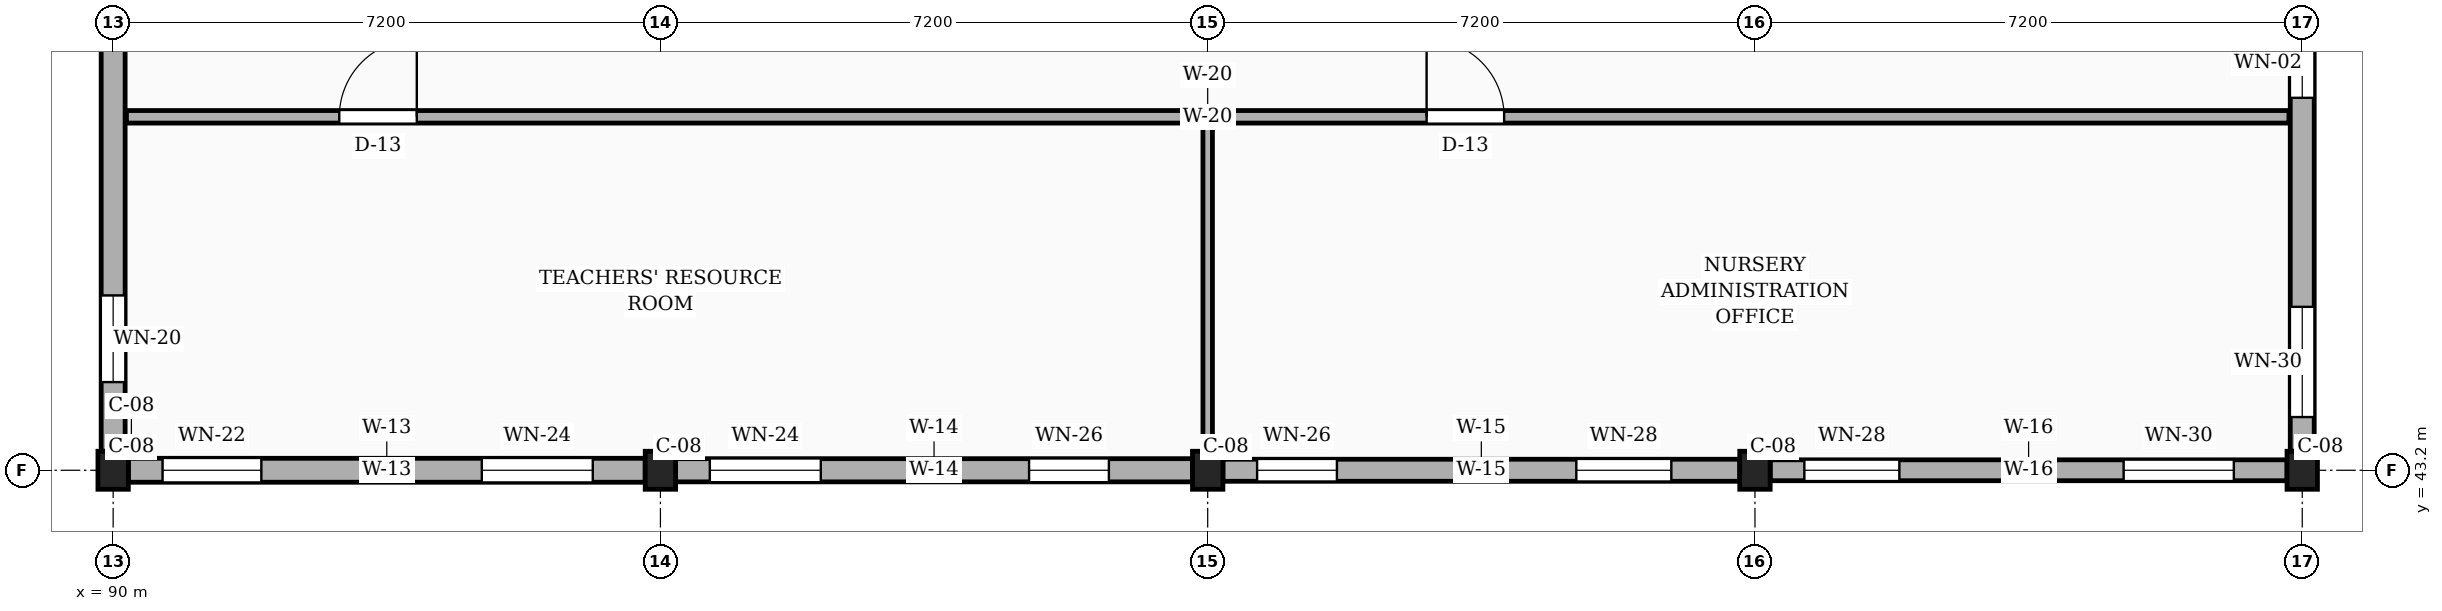
"""IFC4 building model, lengths in metres.
Left out: names, types, materials, properties, quantities, classifications, styles, units other than length and angle.
Written with IfcOpenShell. Run it as: python <this file> out.ifc"""

import sys

from ifc_helpers import new_model, si_unit, direction, frame, frame_2d, origin, origin_2d, place, context, subcontext, project, spatial, rectangle, extrude, element, fill, save


model = new_model("IFC4")
c1 = context("Model", 3, precision=1e-05, world=origin(), true_north=direction((0.0, 1.0)))
c2 = subcontext(c1, "Body", "Model", "MODEL_VIEW")
j1 = project(units=[si_unit("LENGTHUNIT", "METRE"), si_unit("PLANEANGLEUNIT", "RADIAN")], contexts=[c1])
p1 = place(None, origin())
s1 = spatial("IfcSite", under=j1, at=p1, CompositionType="ELEMENT")
p2 = place(p1, origin())
s2 = spatial("IfcBuilding", under=s1, at=p2, CompositionType="ELEMENT")
p3 = place(p2, frame((0.0, 0.0, 4.5)))
s3 = spatial("IfcBuildingStorey", under=s2, at=p3, CompositionType="ELEMENT", Elevation=4.5)
for number, where, z_axis, x_axis in (
    (1, (90.0, 43.2, 0.0), (0.0, 0.0, 1.0), (1.0, 0.0, 0.0)),
    (2, (97.2, 43.2, 0.0), (0.0, 0.0, 1.0), (1.0, 0.0, 0.0)),
    (3, (104.4, 43.2, 0.0), (0.0, 0.0, 1.0), (1.0, 0.0, 0.0)),
    (4, (111.6, 43.2, 0.0), (0.0, 0.0, 1.0), (1.0, 0.0, 0.0)),
    (5, (118.8, 43.2, 0.0), (0.0, 0.0, 1.0), (1.0, 0.0, 0.0)),
):
    element("IfcColumn", number, at=place(p3, frame(where, z_axis=z_axis, x_axis=x_axis)), inside=s3, PredefinedType="COLUMN", context=c2, shape_type="SweptSolid", body=[
        extrude(rectangle(XDim=0.4, YDim=0.5, at=origin_2d()), origin(), (0.0, 0.0, 1.0), 3.15),
    ])
p4 = place(p3, frame((90.2, 43.2, 0.0), z_axis=(0.0, 0.0, 1.0), x_axis=(1.0, 0.0, 0.0)))
e6 = element("IfcWall", 6, at=p4, inside=s3, PredefinedType="SOLIDWALL", context=c2, shape_type="SweptSolid", body=[
    extrude(rectangle(XDim=6.8, YDim=0.315, at=frame_2d((3.4, 0.0))), origin(), (0.0, 0.0, 1.0), 2.34),
])
p5 = place(p4, frame((0.45, 0.0, 0.78)))
e7 = element("IfcOpeningElement", 7, at=p5, cuts=e6, PredefinedType="OPENING", context=c2, shape_type="SweptSolid", body=[
    extrude(rectangle(XDim=1.3, YDim=1.36, at=frame_2d((0.65, 0.68))), frame((0.0, 0.167, 0.0), z_axis=(0.0, -1.0, 0.0), x_axis=(1.0, 0.0, 0.0)), (0.0, 0.0, 1.0), 0.335),
])
p6 = place(p4, frame((4.65, 0.0, 0.78)))
e8 = element("IfcOpeningElement", 8, at=p6, cuts=e6, PredefinedType="OPENING", context=c2, shape_type="SweptSolid", body=[
    extrude(rectangle(XDim=1.46, YDim=1.36, at=frame_2d((0.73, 0.68))), frame((0.0, 0.167, 0.0), z_axis=(0.0, -1.0, 0.0), x_axis=(1.0, 0.0, 0.0)), (0.0, 0.0, 1.0), 0.335),
])
p7 = place(p3, frame((97.4, 43.2, 0.0), z_axis=(0.0, 0.0, 1.0), x_axis=(1.0, 0.0, 0.0)))
e9 = element("IfcWall", 9, at=p7, inside=s3, PredefinedType="SOLIDWALL", context=c2, shape_type="SweptSolid", body=[
    extrude(rectangle(XDim=6.8, YDim=0.305, at=frame_2d((3.4, 0.0))), origin(), (0.0, 0.0, 1.0), 2.34),
])
p8 = place(p7, frame((0.45, 0.0, 0.78)))
e10 = element("IfcOpeningElement", 10, at=p8, cuts=e9, PredefinedType="OPENING", context=c2, shape_type="SweptSolid", body=[
    extrude(rectangle(XDim=1.46, YDim=1.36, at=frame_2d((0.73, 0.68))), frame((0.0, 0.163, 0.0), z_axis=(0.0, -1.0, 0.0), x_axis=(1.0, 0.0, 0.0)), (0.0, 0.0, 1.0), 0.325),
])
p9 = place(p7, frame((4.65, 0.0, 0.78)))
e11 = element("IfcOpeningElement", 11, at=p9, cuts=e9, PredefinedType="OPENING", context=c2, shape_type="SweptSolid", body=[
    extrude(rectangle(XDim=1.05, YDim=1.44, at=frame_2d((0.525, 0.72))), frame((0.0, 0.163, 0.0), z_axis=(0.0, -1.0, 0.0), x_axis=(1.0, 0.0, 0.0)), (0.0, 0.0, 1.0), 0.325),
])
p10 = place(p3, frame((104.6, 43.2, 0.0), z_axis=(0.0, 0.0, 1.0), x_axis=(1.0, 0.0, 0.0)))
e12 = element("IfcWall", 12, at=p10, inside=s3, PredefinedType="SOLIDWALL", context=c2, shape_type="SweptSolid", body=[
    extrude(rectangle(XDim=6.8, YDim=0.29, at=frame_2d((3.4, 0.0))), origin(), (0.0, 0.0, 1.0), 2.34),
])
p11 = place(p10, frame((0.45, 0.0, 0.78)))
e13 = element("IfcOpeningElement", 13, at=p11, cuts=e12, PredefinedType="OPENING", context=c2, shape_type="SweptSolid", body=[
    extrude(rectangle(XDim=1.05, YDim=1.44, at=frame_2d((0.525, 0.72))), frame((0.0, 0.155, 0.0), z_axis=(0.0, -1.0, 0.0), x_axis=(1.0, 0.0, 0.0)), (0.0, 0.0, 1.0), 0.31),
])
p12 = place(p10, frame((4.65, 0.0, 0.78)))
e14 = element("IfcOpeningElement", 14, at=p12, cuts=e12, PredefinedType="OPENING", context=c2, shape_type="SweptSolid", body=[
    extrude(rectangle(XDim=1.25, YDim=1.44, at=frame_2d((0.625, 0.72))), frame((0.0, 0.155, 0.0), z_axis=(0.0, -1.0, 0.0), x_axis=(1.0, 0.0, 0.0)), (0.0, 0.0, 1.0), 0.31),
])
p13 = place(p3, frame((111.8, 43.2, 0.0), z_axis=(0.0, 0.0, 1.0), x_axis=(1.0, 0.0, 0.0)))
e15 = element("IfcWall", 15, at=p13, inside=s3, PredefinedType="SOLIDWALL", context=c2, shape_type="SweptSolid", body=[
    extrude(rectangle(XDim=6.8, YDim=0.275, at=frame_2d((3.4, 0.0))), origin(), (0.0, 0.0, 1.0), 2.34),
])
p14 = place(p13, frame((0.45, 0.0, 0.78)))
e16 = element("IfcOpeningElement", 16, at=p14, cuts=e15, PredefinedType="OPENING", context=c2, shape_type="SweptSolid", body=[
    extrude(rectangle(XDim=1.25, YDim=1.44, at=frame_2d((0.625, 0.72))), frame((0.0, 0.147, 0.0), z_axis=(0.0, -1.0, 0.0), x_axis=(1.0, 0.0, 0.0)), (0.0, 0.0, 1.0), 0.295),
])
p15 = place(p13, frame((4.65, 0.0, 0.78)))
e17 = element("IfcOpeningElement", 17, at=p15, cuts=e15, PredefinedType="OPENING", context=c2, shape_type="SweptSolid", body=[
    extrude(rectangle(XDim=1.45, YDim=1.44, at=frame_2d((0.725, 0.72))), frame((0.0, 0.147, 0.0), z_axis=(0.0, -1.0, 0.0), x_axis=(1.0, 0.0, 0.0)), (0.0, 0.0, 1.0), 0.295),
])
p16 = place(p3, frame((118.8, 43.45, 0.0), z_axis=(0.0, 0.0, 1.0), x_axis=(0.0, 1.0, 0.0)))
e18 = element("IfcWall", 18, at=p16, inside=s3, PredefinedType="SOLIDWALL", context=c2, shape_type="SweptSolid", body=[
    extrude(rectangle(XDim=6.7, YDim=0.315, at=frame_2d((3.35, 0.0))), origin(), (0.0, 0.0, 1.0), 2.34),
])
p17 = place(p16, frame((0.45, 0.0, 0.78)))
e19 = element("IfcOpeningElement", 19, at=p17, cuts=e18, PredefinedType="OPENING", context=c2, shape_type="SweptSolid", body=[
    extrude(rectangle(XDim=1.45, YDim=1.44, at=frame_2d((0.725, 0.72))), frame((0.0, 0.167, 0.0), z_axis=(0.0, -1.0, 0.0), x_axis=(1.0, 0.0, 0.0)), (0.0, 0.0, 1.0), 0.335),
])
p18 = place(p16, frame((4.65, 0.0, 0.78)))
e20 = element("IfcOpeningElement", 20, at=p18, cuts=e18, PredefinedType="OPENING", context=c2, shape_type="SweptSolid", body=[
    extrude(rectangle(XDim=0.92, YDim=1.15, at=frame_2d((0.46, 0.575))), frame((0.0, 0.167, 0.0), z_axis=(0.0, -1.0, 0.0), x_axis=(1.0, 0.0, 0.0)), (0.0, 0.0, 1.0), 0.335),
])
p19 = place(p3, frame((90.0, 50.15, 0.0), z_axis=(0.0, 0.0, 1.0), x_axis=(0.0, -1.0, 0.0)))
e21 = element("IfcWall", 21, at=p19, inside=s3, PredefinedType="SOLIDWALL", context=c2, shape_type="SweptSolid", body=[
    extrude(rectangle(XDim=6.7, YDim=0.315, at=frame_2d((3.35, 0.0))), origin(), (0.0, 0.0, 1.0), 2.34),
])
p20 = place(p19, frame((0.45, 0.0, 0.78)))
e22 = element("IfcOpeningElement", 22, at=p20, cuts=e21, PredefinedType="OPENING", context=c2, shape_type="SweptSolid", body=[
    extrude(rectangle(XDim=0.98, YDim=1.36, at=frame_2d((0.49, 0.68))), frame((0.0, 0.167, 0.0), z_axis=(0.0, -1.0, 0.0), x_axis=(1.0, 0.0, 0.0)), (0.0, 0.0, 1.0), 0.335),
])
p21 = place(p19, frame((4.65, 0.0, 0.78)))
e23 = element("IfcOpeningElement", 23, at=p21, cuts=e21, PredefinedType="OPENING", context=c2, shape_type="SweptSolid", body=[
    extrude(rectangle(XDim=1.14, YDim=1.36, at=frame_2d((0.57, 0.68))), frame((0.0, 0.167, 0.0), z_axis=(0.0, -1.0, 0.0), x_axis=(1.0, 0.0, 0.0)), (0.0, 0.0, 1.0), 0.335),
])
p22 = place(p3, frame((90.175, 47.85, 0.0), z_axis=(0.0, 0.0, 1.0), x_axis=(1.0, 0.0, 0.0)))
e24 = element("IfcWall", 24, at=p22, inside=s3, PredefinedType="PARTITIONING", context=c2, shape_type="SweptSolid", body=[
    extrude(rectangle(XDim=14.145, YDim=0.165, at=frame_2d((7.073, 0.0))), origin(), (0.0, 0.0, 1.0), 2.29),
])
p23 = place(p22, frame((2.8, 0.0, 0.0)))
e25 = element("IfcOpeningElement", 25, at=p23, cuts=e24, PredefinedType="OPENING", context=c2, shape_type="SweptSolid", body=[
    extrude(rectangle(XDim=1.02, YDim=2.15, at=frame_2d((0.51, 1.075))), frame((0.0, 0.093, 0.0), z_axis=(0.0, -1.0, 0.0), x_axis=(1.0, 0.0, 0.0)), (0.0, 0.0, 1.0), 0.185),
])
p24 = place(p3, frame((104.48, 47.85, 0.0), z_axis=(0.0, 0.0, 1.0), x_axis=(1.0, 0.0, 0.0)))
e26 = element("IfcWall", 26, at=p24, inside=s3, PredefinedType="PARTITIONING", context=c2, shape_type="SweptSolid", body=[
    extrude(rectangle(XDim=14.145, YDim=0.165, at=frame_2d((7.073, 0.0))), origin(), (0.0, 0.0, 1.0), 2.29),
])
p25 = place(p24, frame((2.8, 0.0, 0.0)))
e27 = element("IfcOpeningElement", 27, at=p25, cuts=e26, PredefinedType="OPENING", context=c2, shape_type="SweptSolid", body=[
    extrude(rectangle(XDim=1.02, YDim=2.15, at=frame_2d((0.51, 1.075))), frame((0.0, 0.093, 0.0), z_axis=(0.0, -1.0, 0.0), x_axis=(1.0, 0.0, 0.0)), (0.0, 0.0, 1.0), 0.185),
])
p26 = place(p3, frame((104.4, 43.55, 0.0), z_axis=(0.0, 0.0, 1.0), x_axis=(0.0, 1.0, 0.0)))
e28 = element("IfcWall", 28, at=p26, inside=s3, PredefinedType="PARTITIONING", context=c2, shape_type="SweptSolid", body=[
    extrude(rectangle(XDim=4.2, YDim=0.125, at=frame_2d((2.1, 0.0))), origin(), (0.0, 0.0, 1.0), 2.29),
])
p27 = place(p5, origin())
e29 = element("IfcWindow", 29, at=p27, inside=s3, PartitioningType="SINGLE_PANEL", PredefinedType="WINDOW", context=c2, shape_type="SweptSolid", body=[
    extrude(rectangle(XDim=1.3, YDim=1.36, at=frame_2d((0.65, 0.68))), frame((0.0, 0.03, 0.0), z_axis=(0.0, -1.0, 0.0), x_axis=(1.0, 0.0, 0.0)), (0.0, 0.0, 1.0), 0.06),
])
fill(e7, e29)
p28 = place(p6, origin())
e30 = element("IfcWindow", 30, at=p28, inside=s3, PartitioningType="SINGLE_PANEL", PredefinedType="WINDOW", context=c2, shape_type="SweptSolid", body=[
    extrude(rectangle(XDim=1.46, YDim=1.36, at=frame_2d((0.73, 0.68))), frame((0.0, 0.03, 0.0), z_axis=(0.0, -1.0, 0.0), x_axis=(1.0, 0.0, 0.0)), (0.0, 0.0, 1.0), 0.06),
])
fill(e8, e30)
p29 = place(p8, origin())
e31 = element("IfcWindow", 31, at=p29, inside=s3, PartitioningType="SINGLE_PANEL", PredefinedType="WINDOW", context=c2, shape_type="SweptSolid", body=[
    extrude(rectangle(XDim=1.46, YDim=1.36, at=frame_2d((0.73, 0.68))), frame((0.0, 0.03, 0.0), z_axis=(0.0, -1.0, 0.0), x_axis=(1.0, 0.0, 0.0)), (0.0, 0.0, 1.0), 0.06),
])
fill(e10, e31)
p30 = place(p9, origin())
e32 = element("IfcWindow", 32, at=p30, inside=s3, PartitioningType="SINGLE_PANEL", PredefinedType="WINDOW", context=c2, shape_type="SweptSolid", body=[
    extrude(rectangle(XDim=1.05, YDim=1.44, at=frame_2d((0.525, 0.72))), frame((0.0, 0.03, 0.0), z_axis=(0.0, -1.0, 0.0), x_axis=(1.0, 0.0, 0.0)), (0.0, 0.0, 1.0), 0.06),
])
fill(e11, e32)
p31 = place(p11, origin())
e33 = element("IfcWindow", 33, at=p31, inside=s3, PartitioningType="SINGLE_PANEL", PredefinedType="WINDOW", context=c2, shape_type="SweptSolid", body=[
    extrude(rectangle(XDim=1.05, YDim=1.44, at=frame_2d((0.525, 0.72))), frame((0.0, 0.03, 0.0), z_axis=(0.0, -1.0, 0.0), x_axis=(1.0, 0.0, 0.0)), (0.0, 0.0, 1.0), 0.06),
])
fill(e13, e33)
p32 = place(p12, origin())
e34 = element("IfcWindow", 34, at=p32, inside=s3, PartitioningType="SINGLE_PANEL", PredefinedType="WINDOW", context=c2, shape_type="SweptSolid", body=[
    extrude(rectangle(XDim=1.25, YDim=1.44, at=frame_2d((0.625, 0.72))), frame((0.0, 0.03, 0.0), z_axis=(0.0, -1.0, 0.0), x_axis=(1.0, 0.0, 0.0)), (0.0, 0.0, 1.0), 0.06),
])
fill(e14, e34)
p33 = place(p14, origin())
e35 = element("IfcWindow", 35, at=p33, inside=s3, PartitioningType="SINGLE_PANEL", PredefinedType="WINDOW", context=c2, shape_type="SweptSolid", body=[
    extrude(rectangle(XDim=1.25, YDim=1.44, at=frame_2d((0.625, 0.72))), frame((0.0, 0.03, 0.0), z_axis=(0.0, -1.0, 0.0), x_axis=(1.0, 0.0, 0.0)), (0.0, 0.0, 1.0), 0.06),
])
fill(e16, e35)
p34 = place(p15, origin())
e36 = element("IfcWindow", 36, at=p34, inside=s3, PartitioningType="SINGLE_PANEL", PredefinedType="WINDOW", context=c2, shape_type="SweptSolid", body=[
    extrude(rectangle(XDim=1.45, YDim=1.44, at=frame_2d((0.725, 0.72))), frame((0.0, 0.03, 0.0), z_axis=(0.0, -1.0, 0.0), x_axis=(1.0, 0.0, 0.0)), (0.0, 0.0, 1.0), 0.06),
])
fill(e17, e36)
p35 = place(p17, origin())
e37 = element("IfcWindow", 37, at=p35, inside=s3, PartitioningType="SINGLE_PANEL", PredefinedType="WINDOW", context=c2, shape_type="SweptSolid", body=[
    extrude(rectangle(XDim=1.45, YDim=1.44, at=frame_2d((0.725, 0.72))), frame((0.0, 0.03, 0.0), z_axis=(0.0, -1.0, 0.0), x_axis=(1.0, 0.0, 0.0)), (0.0, 0.0, 1.0), 0.06),
])
fill(e19, e37)
p36 = place(p18, origin())
e38 = element("IfcWindow", 38, at=p36, inside=s3, PartitioningType="SINGLE_PANEL", PredefinedType="WINDOW", context=c2, shape_type="SweptSolid", body=[
    extrude(rectangle(XDim=0.92, YDim=1.15, at=frame_2d((0.46, 0.575))), frame((0.0, 0.03, 0.0), z_axis=(0.0, -1.0, 0.0), x_axis=(1.0, 0.0, 0.0)), (0.0, 0.0, 1.0), 0.06),
])
fill(e20, e38)
p37 = place(p21, origin())
e39 = element("IfcWindow", 39, at=p37, inside=s3, PartitioningType="SINGLE_PANEL", PredefinedType="WINDOW", context=c2, shape_type="SweptSolid", body=[
    extrude(rectangle(XDim=1.14, YDim=1.36, at=frame_2d((0.57, 0.68))), frame((0.0, 0.03, 0.0), z_axis=(0.0, -1.0, 0.0), x_axis=(1.0, 0.0, 0.0)), (0.0, 0.0, 1.0), 0.06),
])
fill(e23, e39)
p38 = place(p23, origin())
e40 = element("IfcDoor", 40, at=p38, inside=s3, OperationType="SINGLE_SWING_RIGHT", PredefinedType="DOOR", context=c2, shape_type="SweptSolid", body=[
    extrude(rectangle(XDim=1.02, YDim=2.15, at=frame_2d((0.51, 1.075))), frame((0.0, 0.025, 0.0), z_axis=(0.0, -1.0, 0.0), x_axis=(1.0, 0.0, 0.0)), (0.0, 0.0, 1.0), 0.05),
])
fill(e25, e40)
p39 = place(p25, origin())
e41 = element("IfcDoor", 41, at=p39, inside=s3, OperationType="SINGLE_SWING_LEFT", PredefinedType="DOOR", context=c2, shape_type="SweptSolid", body=[
    extrude(rectangle(XDim=1.02, YDim=2.15, at=frame_2d((0.51, 1.075))), frame((0.0, 0.025, 0.0), z_axis=(0.0, -1.0, 0.0), x_axis=(1.0, 0.0, 0.0)), (0.0, 0.0, 1.0), 0.05),
])
fill(e27, e41)
save(model, sys.argv[1])
